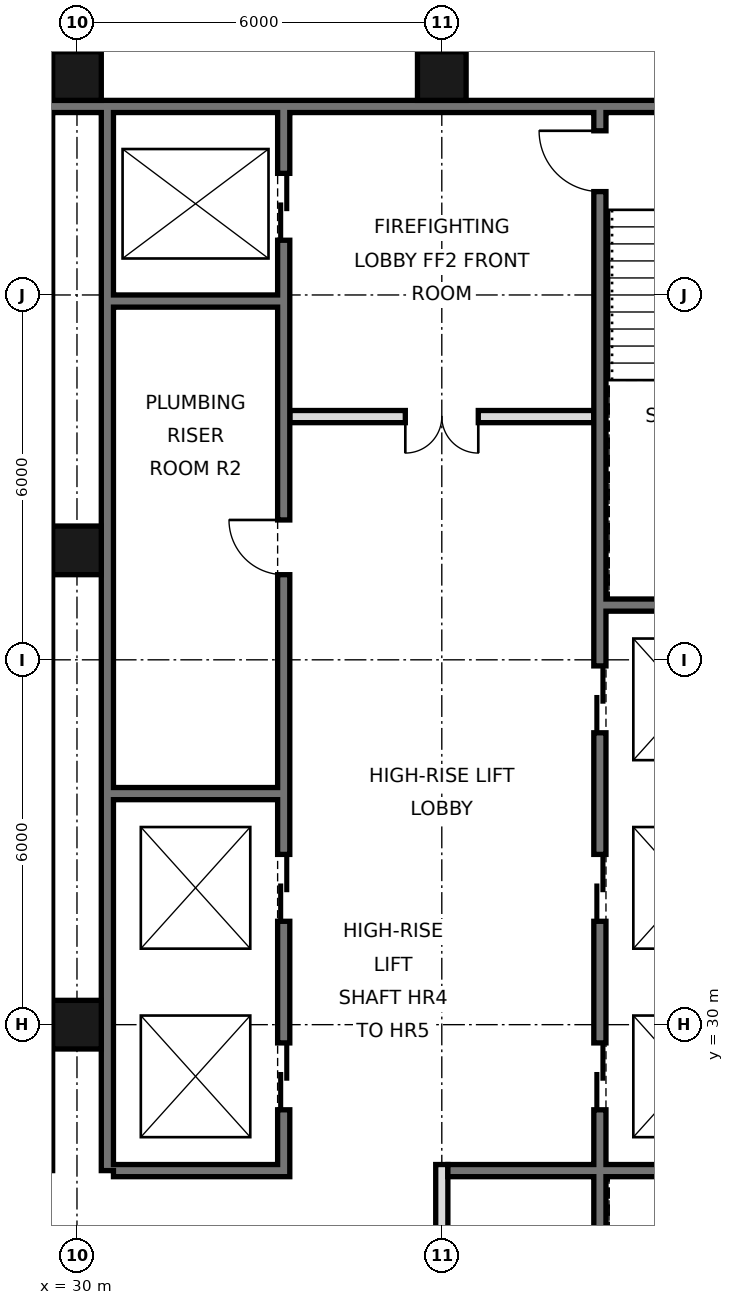
"""IFC4 building model, lengths in metres.
Left out: names, types, materials, properties, quantities, classifications, styles, units other than length and angle.
Written with IfcOpenShell. Run it as: python <this file> out.ifc"""

import sys

from ifc_helpers import new_model, si_unit, direction, frame, frame_2d, origin, origin_2d, place, context, subcontext, project, spatial, rectangle, hollow_rectangle, extrude, element, fill, save


model = new_model("IFC4")
c1 = context("Model", 3, precision=1e-05, world=origin(), true_north=direction((0.0, 1.0)))
c2 = subcontext(c1, "Body", "Model", "MODEL_VIEW")
j1 = project(units=[si_unit("LENGTHUNIT", "METRE"), si_unit("PLANEANGLEUNIT", "RADIAN")], contexts=[c1])
p1 = place(None, origin())
s1 = spatial("IfcSite", under=j1, at=p1, CompositionType="ELEMENT")
p2 = place(p1, origin())
s2 = spatial("IfcBuilding", under=s1, at=p2, CompositionType="ELEMENT")
p3 = place(p2, frame((0.0, 0.0, 206.4)))
s3 = spatial("IfcBuildingStorey", under=s2, at=p3, CompositionType="ELEMENT", Elevation=206.4)
for number, where, z_axis, x_axis in (
    (1, (30.0, 30.0, 0.0), (0.0, 0.0, 1.0), (1.0, 0.0, 0.0)),
    (2, (30.0, 37.8, 0.0), (0.0, 0.0, 1.0), (1.0, 0.0, 0.0)),
    (3, (30.0, 45.6, 0.0), (0.0, 0.0, 1.0), (1.0, 0.0, 0.0)),
    (4, (36.0, 45.6, 0.0), (0.0, 0.0, 1.0), (1.0, 0.0, 0.0)),
):
    element("IfcColumn", number, at=place(p3, frame(where, z_axis=z_axis, x_axis=x_axis)), inside=s3, PredefinedType="COLUMN", context=c2, shape_type="SweptSolid", body=[
        extrude(hollow_rectangle(XDim=0.8, YDim=0.8, WallThickness=0.04, at=origin_2d()), origin(), (0.0, 0.0, 1.0), 3.6),
    ])
p4 = place(p3, frame((6.6, 45.1, 0.0), z_axis=(0.0, 0.0, 1.0), x_axis=(1.0, 0.0, 0.0)))
e5 = element("IfcWall", 5, at=p4, inside=s3, PredefinedType="SOLIDWALL", context=c2, shape_type="SweptSolid", body=[
    extrude(rectangle(XDim=34.8, YDim=0.2, at=frame_2d((17.4, 0.0))), origin(), (0.0, 0.0, 1.0), 3.38),
])
p5 = place(p3, frame((30.5, 27.6, 0.0), z_axis=(0.0, 0.0, 1.0), x_axis=(0.0, 1.0, 0.0)))
e6 = element("IfcWall", 6, at=p5, inside=s3, PredefinedType="SOLIDWALL", context=c2, shape_type="SweptSolid", body=[
    extrude(rectangle(XDim=17.5, YDim=0.2, at=frame_2d((8.75, 0.0))), origin(), (0.0, 0.0, 1.0), 3.38),
])
p6 = place(p3, frame((33.4, 27.5, 0.0), z_axis=(0.0, 0.0, 1.0), x_axis=(0.0, 1.0, 0.0)))
e7 = element("IfcWall", 7, at=p6, inside=s3, PredefinedType="SOLIDWALL", context=c2, shape_type="SweptSolid", body=[
    extrude(rectangle(XDim=17.5, YDim=0.2, at=frame_2d((8.75, 0.0))), origin(), (0.0, 0.0, 1.0), 3.38),
])
p7 = place(p6, frame((1.1, 0.0, 0.0)))
e8 = element("IfcOpeningElement", 8, at=p7, cuts=e7, PredefinedType="OPENING", context=c2, shape_type="SweptSolid", body=[
    extrude(rectangle(XDim=1.1, YDim=2.1, at=frame_2d((0.55, 1.05))), frame((0.0, 0.11, 0.0), z_axis=(0.0, -1.0, 0.0), x_axis=(1.0, 0.0, 0.0)), (0.0, 0.0, 1.0), 0.22),
])
p8 = place(p6, frame((4.2, 0.0, 0.0)))
e9 = element("IfcOpeningElement", 9, at=p8, cuts=e7, PredefinedType="OPENING", context=c2, shape_type="SweptSolid", body=[
    extrude(rectangle(XDim=1.1, YDim=2.1, at=frame_2d((0.55, 1.05))), frame((0.0, 0.11, 0.0), z_axis=(0.0, -1.0, 0.0), x_axis=(1.0, 0.0, 0.0)), (0.0, 0.0, 1.0), 0.22),
])
p9 = place(p6, frame((15.4, 0.0, 0.0)))
e10 = element("IfcOpeningElement", 10, at=p9, cuts=e7, PredefinedType="OPENING", context=c2, shape_type="SweptSolid", body=[
    extrude(rectangle(XDim=1.1, YDim=2.1, at=frame_2d((0.55, 1.05))), frame((0.0, 0.11, 0.0), z_axis=(0.0, -1.0, 0.0), x_axis=(1.0, 0.0, 0.0)), (0.0, 0.0, 1.0), 0.22),
])
p10 = place(p6, frame((9.9, 0.0, 0.0)))
e11 = element("IfcOpeningElement", 11, at=p10, cuts=e7, PredefinedType="OPENING", context=c2, shape_type="SweptSolid", body=[
    extrude(rectangle(XDim=0.9, YDim=2.1, at=frame_2d((0.45, 1.05))), frame((0.0, 0.11, 0.0), z_axis=(0.0, -1.0, 0.0), x_axis=(1.0, 0.0, 0.0)), (0.0, 0.0, 1.0), 0.22),
])
p11 = place(p3, frame((36.0, 21.6, 0.0), z_axis=(0.0, 0.0, 1.0), x_axis=(0.0, 1.0, 0.0)))
e12 = element("IfcWall", 12, at=p11, inside=s3, PredefinedType="PARTITIONING", context=c2, shape_type="SweptSolid", body=[
    extrude(rectangle(XDim=6.1, YDim=0.2, at=frame_2d((3.05, 0.0))), origin(), (0.0, 0.0, 1.0), 3.38),
])
p12 = place(p3, frame((38.6, 21.6, 0.0), z_axis=(0.0, 0.0, 1.0), x_axis=(0.0, 1.0, 0.0)))
e13 = element("IfcWall", 13, at=p12, inside=s3, PredefinedType="SOLIDWALL", context=c2, shape_type="SweptSolid", body=[
    extrude(rectangle(XDim=23.4, YDim=0.2, at=frame_2d((11.7, 0.0))), origin(), (0.0, 0.0, 1.0), 3.38),
])
p13 = place(p12, frame((7.0, 0.0, 0.0)))
e14 = element("IfcOpeningElement", 14, at=p13, cuts=e13, PredefinedType="OPENING", context=c2, shape_type="SweptSolid", body=[
    extrude(rectangle(XDim=1.1, YDim=2.1, at=frame_2d((0.55, 1.05))), frame((0.0, 0.11, 0.0), z_axis=(0.0, -1.0, 0.0), x_axis=(1.0, 0.0, 0.0)), (0.0, 0.0, 1.0), 0.22),
])
p14 = place(p12, frame((10.1, 0.0, 0.0)))
e15 = element("IfcOpeningElement", 15, at=p14, cuts=e13, PredefinedType="OPENING", context=c2, shape_type="SweptSolid", body=[
    extrude(rectangle(XDim=1.1, YDim=2.1, at=frame_2d((0.55, 1.05))), frame((0.0, 0.11, 0.0), z_axis=(0.0, -1.0, 0.0), x_axis=(1.0, 0.0, 0.0)), (0.0, 0.0, 1.0), 0.22),
])
p15 = place(p12, frame((13.2, 0.0, 0.0)))
e16 = element("IfcOpeningElement", 16, at=p15, cuts=e13, PredefinedType="OPENING", context=c2, shape_type="SweptSolid", body=[
    extrude(rectangle(XDim=1.1, YDim=2.1, at=frame_2d((0.55, 1.05))), frame((0.0, 0.11, 0.0), z_axis=(0.0, -1.0, 0.0), x_axis=(1.0, 0.0, 0.0)), (0.0, 0.0, 1.0), 0.22),
])
p16 = place(p12, frame((22.1, 0.0, 0.0)))
e17 = element("IfcOpeningElement", 17, at=p16, cuts=e13, PredefinedType="OPENING", context=c2, shape_type="SweptSolid", body=[
    extrude(rectangle(XDim=1.0, YDim=2.1, at=frame_2d((0.5, 1.05))), frame((0.0, 0.11, 0.0), z_axis=(0.0, -1.0, 0.0), x_axis=(1.0, 0.0, 0.0)), (0.0, 0.0, 1.0), 0.22),
])
p17 = place(p12, frame((0.175, 0.0, 0.0)))
e18 = element("IfcOpeningElement", 18, at=p17, cuts=e13, PredefinedType="OPENING", context=c2, shape_type="SweptSolid", body=[
    extrude(rectangle(XDim=0.9, YDim=2.1, at=frame_2d((0.45, 1.05))), frame((0.0, 0.11, 0.0), z_axis=(0.0, -1.0, 0.0), x_axis=(1.0, 0.0, 0.0)), (0.0, 0.0, 1.0), 0.22),
])
p18 = place(p3, frame((30.6, 27.6, 0.0), z_axis=(0.0, 0.0, 1.0), x_axis=(1.0, 0.0, 0.0)))
e19 = element("IfcWall", 19, at=p18, inside=s3, PredefinedType="SOLIDWALL", context=c2, shape_type="SweptSolid", body=[
    extrude(rectangle(XDim=2.7, YDim=0.2, at=frame_2d((1.35, 0.0))), origin(), (0.0, 0.0, 1.0), 3.38),
])
p19 = place(p3, frame((36.1, 27.6, 0.0), z_axis=(0.0, 0.0, 1.0), x_axis=(1.0, 0.0, 0.0)))
e20 = element("IfcWall", 20, at=p19, inside=s3, PredefinedType="SOLIDWALL", context=c2, shape_type="SweptSolid", body=[
    extrude(rectangle(XDim=5.3, YDim=0.2, at=frame_2d((2.65, 0.0))), origin(), (0.0, 0.0, 1.0), 3.38),
])
for number, where, z_axis, x_axis in (
    (21, (30.6, 33.8, 0.0), (0.0, 0.0, 1.0), (1.0, 0.0, 0.0)),
    (22, (38.7, 36.9, 0.0), (0.0, 0.0, 1.0), (1.0, 0.0, 0.0)),
):
    element("IfcWall", number, at=place(p3, frame(where, z_axis=z_axis, x_axis=x_axis)), inside=s3, PredefinedType="SOLIDWALL", context=c2, shape_type="SweptSolid", body=[
        extrude(rectangle(XDim=2.7, YDim=0.2, at=frame_2d((1.35, 0.0))), origin(), (0.0, 0.0, 1.0), 3.38),
    ])
p20 = place(p3, frame((33.5, 40.0, 0.0), z_axis=(0.0, 0.0, 1.0), x_axis=(1.0, 0.0, 0.0)))
e23 = element("IfcWall", 23, at=p20, inside=s3, PredefinedType="PARTITIONING", context=c2, shape_type="SweptSolid", body=[
    extrude(rectangle(XDim=5.0, YDim=0.2, at=frame_2d((2.5, 0.0))), origin(), (0.0, 0.0, 1.0), 3.38),
])
p21 = place(p20, frame((1.9, 0.0, 0.0)))
e24 = element("IfcOpeningElement", 24, at=p21, cuts=e23, PredefinedType="OPENING", context=c2, shape_type="SweptSolid", body=[
    extrude(rectangle(XDim=1.2, YDim=2.1, at=frame_2d((0.6, 1.05))), frame((0.0, 0.11, 0.0), z_axis=(0.0, -1.0, 0.0), x_axis=(1.0, 0.0, 0.0)), (0.0, 0.0, 1.0), 0.22),
])
p22 = place(p3, frame((30.6, 41.9, 0.0), z_axis=(0.0, 0.0, 1.0), x_axis=(1.0, 0.0, 0.0)))
e25 = element("IfcWall", 25, at=p22, inside=s3, PredefinedType="SOLIDWALL", context=c2, shape_type="SweptSolid", body=[
    extrude(rectangle(XDim=2.7, YDim=0.2, at=frame_2d((1.35, 0.0))), origin(), (0.0, 0.0, 1.0), 3.38),
])
p23 = place(p21, frame((1.2, 0.0, 0.0), z_axis=(0.0, 0.0, 1.0), x_axis=(-1.0, 0.0, 0.0)))
e26 = element("IfcDoor", 26, at=p23, inside=s3, OperationType="DOUBLE_DOOR_SINGLE_SWING", PredefinedType="DOOR", context=c2, shape_type="SweptSolid", body=[
    extrude(rectangle(XDim=1.2, YDim=2.1, at=frame_2d((0.6, 1.05))), frame((0.0, 0.025, 0.0), z_axis=(0.0, -1.0, 0.0), x_axis=(1.0, 0.0, 0.0)), (0.0, 0.0, 1.0), 0.05),
])
fill(e24, e26)
p24 = place(p13, origin())
e27 = element("IfcDoor", 27, at=p24, inside=s3, OperationType="DOUBLE_DOOR_SLIDING", PredefinedType="DOOR", context=c2, shape_type="SweptSolid", body=[
    extrude(rectangle(XDim=1.1, YDim=2.1, at=frame_2d((0.55, 1.05))), frame((0.0, 0.025, 0.0), z_axis=(0.0, -1.0, 0.0), x_axis=(1.0, 0.0, 0.0)), (0.0, 0.0, 1.0), 0.05),
])
fill(e14, e27)
p25 = place(p14, origin())
e28 = element("IfcDoor", 28, at=p25, inside=s3, OperationType="DOUBLE_DOOR_SLIDING", PredefinedType="DOOR", context=c2, shape_type="SweptSolid", body=[
    extrude(rectangle(XDim=1.1, YDim=2.1, at=frame_2d((0.55, 1.05))), frame((0.0, 0.025, 0.0), z_axis=(0.0, -1.0, 0.0), x_axis=(1.0, 0.0, 0.0)), (0.0, 0.0, 1.0), 0.05),
])
fill(e15, e28)
p26 = place(p15, origin())
e29 = element("IfcDoor", 29, at=p26, inside=s3, OperationType="DOUBLE_DOOR_SLIDING", PredefinedType="DOOR", context=c2, shape_type="SweptSolid", body=[
    extrude(rectangle(XDim=1.1, YDim=2.1, at=frame_2d((0.55, 1.05))), frame((0.0, 0.025, 0.0), z_axis=(0.0, -1.0, 0.0), x_axis=(1.0, 0.0, 0.0)), (0.0, 0.0, 1.0), 0.05),
])
fill(e16, e29)
p27 = place(p7, origin())
e30 = element("IfcDoor", 30, at=p27, inside=s3, OperationType="DOUBLE_DOOR_SLIDING", PredefinedType="DOOR", context=c2, shape_type="SweptSolid", body=[
    extrude(rectangle(XDim=1.1, YDim=2.1, at=frame_2d((0.55, 1.05))), frame((0.0, 0.025, 0.0), z_axis=(0.0, -1.0, 0.0), x_axis=(1.0, 0.0, 0.0)), (0.0, 0.0, 1.0), 0.05),
])
fill(e8, e30)
p28 = place(p8, origin())
e31 = element("IfcDoor", 31, at=p28, inside=s3, OperationType="DOUBLE_DOOR_SLIDING", PredefinedType="DOOR", context=c2, shape_type="SweptSolid", body=[
    extrude(rectangle(XDim=1.1, YDim=2.1, at=frame_2d((0.55, 1.05))), frame((0.0, 0.025, 0.0), z_axis=(0.0, -1.0, 0.0), x_axis=(1.0, 0.0, 0.0)), (0.0, 0.0, 1.0), 0.05),
])
fill(e9, e31)
p29 = place(p9, origin())
e32 = element("IfcDoor", 32, at=p29, inside=s3, OperationType="DOUBLE_DOOR_SLIDING", PredefinedType="DOOR", context=c2, shape_type="SweptSolid", body=[
    extrude(rectangle(XDim=1.1, YDim=2.1, at=frame_2d((0.55, 1.05))), frame((0.0, 0.025, 0.0), z_axis=(0.0, -1.0, 0.0), x_axis=(1.0, 0.0, 0.0)), (0.0, 0.0, 1.0), 0.05),
])
fill(e10, e32)
p30 = place(p16, frame((1.0, 0.0, 0.0), z_axis=(0.0, 0.0, 1.0), x_axis=(-1.0, 0.0, 0.0)))
e33 = element("IfcDoor", 33, at=p30, inside=s3, OperationType="SINGLE_SWING_LEFT", PredefinedType="DOOR", context=c2, shape_type="SweptSolid", body=[
    extrude(rectangle(XDim=1.0, YDim=2.1, at=frame_2d((0.5, 1.05))), frame((0.0, 0.025, 0.0), z_axis=(0.0, -1.0, 0.0), x_axis=(1.0, 0.0, 0.0)), (0.0, 0.0, 1.0), 0.05),
])
fill(e17, e33)
p31 = place(p10, frame((0.9, 0.0, 0.0), z_axis=(0.0, 0.0, 1.0), x_axis=(-1.0, 0.0, 0.0)))
e34 = element("IfcDoor", 34, at=p31, inside=s3, OperationType="SINGLE_SWING_LEFT", PredefinedType="DOOR", context=c2, shape_type="SweptSolid", body=[
    extrude(rectangle(XDim=0.9, YDim=2.1, at=frame_2d((0.45, 1.05))), frame((0.0, 0.025, 0.0), z_axis=(0.0, -1.0, 0.0), x_axis=(1.0, 0.0, 0.0)), (0.0, 0.0, 1.0), 0.05),
])
fill(e11, e34)
save(model, sys.argv[1])
